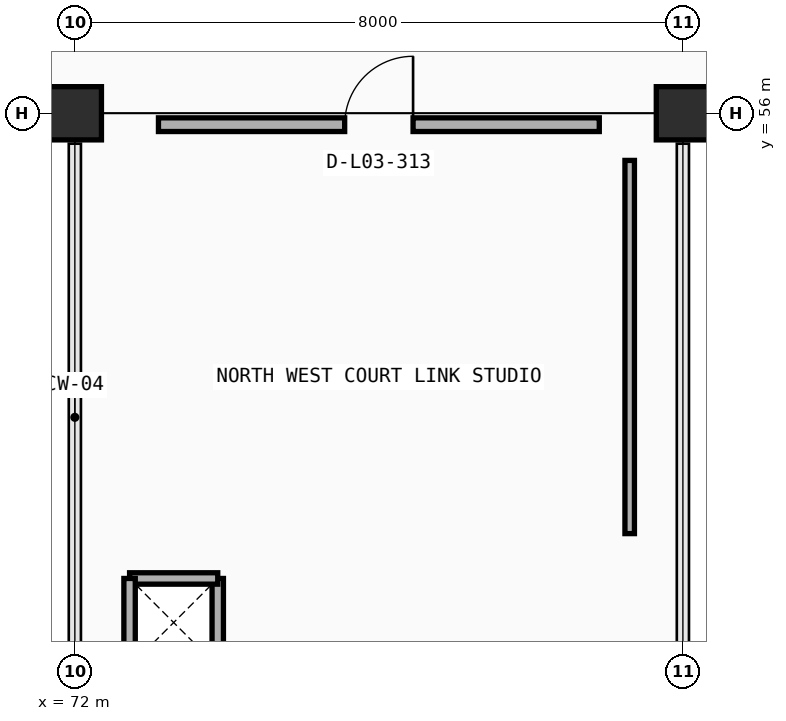
"""IFC4 building model, lengths in metres.
Left out: names, types, materials, properties, quantities, classifications, styles, units other than length and angle.
Written with IfcOpenShell. Run it as: python <this file> out.ifc"""

import sys

from ifc_helpers import new_model, si_unit, direction, frame, frame_2d, origin, origin_2d, place, context, subcontext, project, spatial, rectangle, extrude, element, fill, save


model = new_model("IFC4")
c1 = context("Model", 3, precision=1e-05, world=origin(), true_north=direction((0.0, 1.0)))
c2 = subcontext(c1, "Body", "Model", "MODEL_VIEW")
j1 = project(units=[si_unit("LENGTHUNIT", "METRE"), si_unit("PLANEANGLEUNIT", "RADIAN")], contexts=[c1])
p1 = place(None, origin())
s1 = spatial("IfcSite", under=j1, at=p1, CompositionType="ELEMENT")
p2 = place(p1, origin())
s2 = spatial("IfcBuilding", under=s1, at=p2, CompositionType="ELEMENT")
p3 = place(p2, frame((0.0, 0.0, 9.6)))
s3 = spatial("IfcBuildingStorey", under=s2, at=p3, CompositionType="ELEMENT", Elevation=9.6)
for number, where, z_axis, x_axis in (
    (1, (72.0, 56.0, 0.0), (0.0, 0.0, 1.0), (1.0, 0.0, 0.0)),
    (2, (80.0, 56.0, 0.0), (0.0, 0.0, 1.0), (1.0, 0.0, 0.0)),
):
    element("IfcColumn", number, at=place(p3, frame(where, z_axis=z_axis, x_axis=x_axis)), inside=s3, PredefinedType="COLUMN", context=c2, shape_type="SweptSolid", body=[
        extrude(rectangle(XDim=0.7, YDim=0.7, at=origin_2d()), origin(), (0.0, 0.0, 1.0), 4.2),
    ])
for number, where, z_axis, x_axis in (
    (3, (73.88, 48.72, 0.0), (0.0, 0.0, 1.0), (0.0, 1.0, 0.0)),
    (4, (73.88, 49.88, 0.0), (0.0, 0.0, 1.0), (-1.0, 0.0, 0.0)),
    (5, (72.72, 49.88, 0.0), (0.0, 0.0, 1.0), (0.0, -1.0, 0.0)),
):
    element("IfcWall", number, at=place(p3, frame(where, z_axis=z_axis, x_axis=x_axis)), inside=s3, PredefinedType="PARTITIONING", context=c2, shape_type="SweptSolid", body=[
        extrude(rectangle(XDim=1.16, YDim=0.15, at=frame_2d((0.58, 0.0))), origin(), (0.0, 0.0, 1.0), 3.9),
    ])
p4 = place(p3, frame((73.1, 55.85, 0.0), z_axis=(0.0, 0.0, 1.0), x_axis=(1.0, 0.0, 0.0)))
e6 = element("IfcWall", 6, at=p4, inside=s3, PredefinedType="PARTITIONING", context=c2, shape_type="SweptSolid", body=[
    extrude(rectangle(XDim=5.8, YDim=0.18, at=frame_2d((2.9, 0.0))), origin(), (0.0, 0.0, 1.0), 3.3),
])
p5 = place(p4, frame((2.45, 0.0, 0.0)))
e7 = element("IfcOpeningElement", 7, at=p5, cuts=e6, PredefinedType="OPENING", context=c2, shape_type="SweptSolid", body=[
    extrude(rectangle(XDim=0.9, YDim=2.1, at=frame_2d((0.45, 1.05))), frame((0.0, 0.1, 0.0), z_axis=(0.0, -1.0, 0.0), x_axis=(1.0, 0.0, 0.0)), (0.0, 0.0, 1.0), 0.2),
])
p6 = place(p3, frame((79.3, 50.47, 0.0), z_axis=(0.0, 0.0, 1.0), x_axis=(0.0, 1.0, 0.0)))
e8 = element("IfcWall", 8, at=p6, inside=s3, PredefinedType="PARTITIONING", context=c2, shape_type="SweptSolid", body=[
    extrude(rectangle(XDim=4.91, YDim=0.125, at=frame_2d((2.455, 0.0))), origin(), (0.0, 0.0, 1.0), 3.3),
])
p7 = place(p5, origin())
e9 = element("IfcDoor", 9, at=p7, inside=s3, OperationType="SINGLE_SWING_RIGHT", PredefinedType="DOOR", context=c2, shape_type="SweptSolid", body=[
    extrude(rectangle(XDim=0.9, YDim=2.1, at=frame_2d((0.45, 1.05))), frame((0.0, 0.025, 0.0), z_axis=(0.0, -1.0, 0.0), x_axis=(1.0, 0.0, 0.0)), (0.0, 0.0, 1.0), 0.05),
])
fill(e7, e9)
save(model, sys.argv[1])
